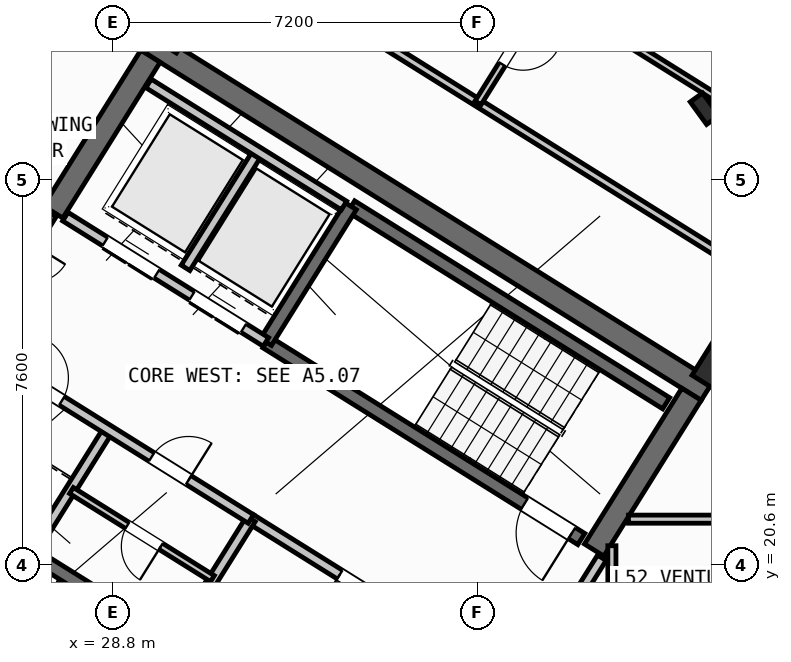
"""IFC4 building model, lengths in metres.
Left out: names, types, materials, properties, quantities, classifications, styles, units other than length and angle.
Written with IfcOpenShell. Run it as: python <this file> out.ifc"""

import sys

from ifc_helpers import new_model, si_unit, direction, frame, frame_2d, origin, origin_2d, place, context, subcontext, project, spatial, rectangle, hollow_rectangle, i_section, extrude, source, transform, mapped, element, fill, save


model = new_model("IFC4")
c1 = context("Model", 3, precision=1e-05, world=origin(), true_north=direction((0.0, 1.0)))
c2 = subcontext(c1, "Body", "Model", "MODEL_VIEW")
j1 = project(units=[si_unit("LENGTHUNIT", "METRE"), si_unit("PLANEANGLEUNIT", "RADIAN")], contexts=[c1])
p1 = place(None, origin())
s1 = spatial("IfcSite", under=j1, at=p1, CompositionType="ELEMENT")
p2 = place(p1, origin())
s2 = spatial("IfcBuilding", under=s1, at=p2, CompositionType="ELEMENT")
p3 = place(p2, frame((0.0, 0.0, 207.6)))
s3 = spatial("IfcBuildingStorey", under=s2, at=p3, CompositionType="ELEMENT", Elevation=207.6)
p4 = place(p3, frame((40.531, 24.036, 0.0), z_axis=(0.0, 0.0, 1.0), x_axis=(-0.848048787466, 0.529918157905, 0.0)))
e1 = element("IfcWall", 1, at=p4, inside=s3, PredefinedType="SHEAR", context=c2, shape_type="SweptSolid", body=[
    extrude(rectangle(XDim=13.04, YDim=0.45, at=frame_2d((6.52, 0.0))), origin(), (0.0, 0.0, 1.0), 3.35),
])
for number, where, z_axis, x_axis in (
    (2, (40.221, 23.965, 0.0), (0.0, 0.0, 1.0), (-0.53, -0.848, 0.0)),
    (3, (29.544, 30.636, 0.0), (0.0, 0.0, 1.0), (-0.53, -0.848, 0.0)),
):
    element("IfcWall", number, at=place(p3, frame(where, z_axis=z_axis, x_axis=x_axis)), inside=s3, PredefinedType="SHEAR", context=c2, shape_type="SweptSolid", body=[
        extrude(rectangle(XDim=3.625, YDim=0.45, at=frame_2d((1.812, 0.0))), origin(), (0.0, 0.0, 1.0), 3.35),
    ])
m1 = source(origin(), c2, "Body", "SweptSolid", [
    extrude(hollow_rectangle(XDim=0.8, YDim=0.8, WallThickness=0.032, at=origin_2d()), origin(), (0.0, 0.0, 1.0), 3.6),
])
for number, where, z_axis, x_axis in (
    (4, (40.783, 24.469, 0.0), (0.0, 0.0, 1.0), (-0.848, 0.53, 0.0)),
    (5, (29.928, 31.251, 0.0), (0.0, 0.0, 1.0), (-0.848, 0.53, 0.0)),
):
    element("IfcColumn", number, at=place(p3, frame(where, z_axis=z_axis, x_axis=x_axis)), inside=s3, PredefinedType="COLUMN", context=c2, shape_type="MappedRepresentation", body=[
        mapped(m1, transform((0.0, 0.0, 0.0), scale=1.0)),
    ])
m2 = source(origin(), c2, "Body", "SweptSolid", [
    extrude(i_section(OverallWidth=0.3, OverallDepth=0.55, WebThickness=0.015, FlangeThickness=0.029, at=origin_2d()), origin(), (0.0, 0.0, 1.0), 3.6),
])
p5 = place(p3, frame((40.479, 29.601, 0.0), z_axis=(0.0, 0.0, 1.0), x_axis=(0.809016994375, 0.587785252292, 0.0)))
e6 = element("IfcColumn", 6, at=p5, inside=s3, PredefinedType="COLUMN", context=c2, shape_type="MappedRepresentation", body=[
    mapped(m2, transform((0.0, 0.0, 0.0), scale=1.0)),
])
p6 = place(p3, frame((31.76, 12.183, 0.0), z_axis=(0.0, 0.0, 1.0), x_axis=(-0.848047074256, 0.529920899612, 0.0)))
e7 = element("IfcWall", 7, at=p6, inside=s3, PredefinedType="STANDARD", context=c2, shape_type="SweptSolid", body=[
    extrude(rectangle(XDim=30.652, YDim=0.32, at=frame_2d((15.326, 0.0))), origin(), (0.0, 0.0, 1.0), 3.35),
])
p7 = place(p6, frame((15.166, 0.0, 0.0)))
e8 = element("IfcOpeningElement", 8, at=p7, cuts=e7, PredefinedType="OPENING", context=c2, shape_type="SweptSolid", body=[
    extrude(rectangle(XDim=1.2, YDim=2.15, at=frame_2d((0.6, 1.075))), frame((0.0, 0.17, 0.0), z_axis=(0.0, -1.0, 0.0), x_axis=(1.0, 0.0, 0.0)), (0.0, 0.0, 1.0), 0.34),
])
p8 = place(p6, frame((2.24, 0.0, 0.9)))
e9 = element("IfcOpeningElement", 9, at=p8, cuts=e7, PredefinedType="OPENING", context=c2, shape_type="SweptSolid", body=[
    extrude(rectangle(XDim=1.65, YDim=1.45, at=frame_2d((0.825, 0.725))), frame((0.0, 0.17, 0.0), z_axis=(0.0, -1.0, 0.0), x_axis=(1.0, 0.0, 0.0)), (0.0, 0.0, 1.0), 0.34),
])
p9 = place(p6, frame((7.469, 0.0, 0.9)))
e10 = element("IfcOpeningElement", 10, at=p9, cuts=e7, PredefinedType="OPENING", context=c2, shape_type="SweptSolid", body=[
    extrude(rectangle(XDim=1.65, YDim=1.45, at=frame_2d((0.825, 0.725))), frame((0.0, 0.17, 0.0), z_axis=(0.0, -1.0, 0.0), x_axis=(1.0, 0.0, 0.0)), (0.0, 0.0, 1.0), 0.34),
])
p10 = place(p6, frame((12.623, 0.0, 1.0)))
e11 = element("IfcOpeningElement", 11, at=p10, cuts=e7, PredefinedType="OPENING", context=c2, shape_type="SweptSolid", body=[
    extrude(rectangle(XDim=0.9, YDim=1.25, at=frame_2d((0.45, 0.625))), frame((0.0, 0.17, 0.0), z_axis=(0.0, -1.0, 0.0), x_axis=(1.0, 0.0, 0.0)), (0.0, 0.0, 1.0), 0.34),
])
p11 = place(p6, frame((19.715, 0.0, 1.0)))
e12 = element("IfcOpeningElement", 12, at=p11, cuts=e7, PredefinedType="OPENING", context=c2, shape_type="SweptSolid", body=[
    extrude(rectangle(XDim=0.9, YDim=1.25, at=frame_2d((0.45, 0.625))), frame((0.0, 0.17, 0.0), z_axis=(0.0, -1.0, 0.0), x_axis=(1.0, 0.0, 0.0)), (0.0, 0.0, 1.0), 0.34),
])
p12 = place(p6, frame((25.566, 0.0, 0.9)))
e13 = element("IfcOpeningElement", 13, at=p12, cuts=e7, PredefinedType="OPENING", context=c2, shape_type="SweptSolid", body=[
    extrude(rectangle(XDim=1.65, YDim=1.45, at=frame_2d((0.825, 0.725))), frame((0.0, 0.17, 0.0), z_axis=(0.0, -1.0, 0.0), x_axis=(1.0, 0.0, 0.0)), (0.0, 0.0, 1.0), 0.34),
])
p13 = place(p6, frame((28.896, 0.0, 1.0)))
e14 = element("IfcOpeningElement", 14, at=p13, cuts=e7, PredefinedType="OPENING", context=c2, shape_type="SweptSolid", body=[
    extrude(rectangle(XDim=0.9, YDim=1.25, at=frame_2d((0.45, 0.625))), frame((0.0, 0.17, 0.0), z_axis=(0.0, -1.0, 0.0), x_axis=(1.0, 0.0, 0.0)), (0.0, 0.0, 1.0), 0.34),
])
p14 = place(p3, frame((31.28, 18.261, 0.0), z_axis=(0.0, 0.0, 1.0), x_axis=(-0.848051618787, 0.529913626805, 0.0)))
e15 = element("IfcWall", 15, at=p14, inside=s3, PredefinedType="SHEAR", context=c2, shape_type="SweptSolid", body=[
    extrude(rectangle(XDim=7.46, YDim=0.26, at=frame_2d((3.73, 0.0))), origin(), (0.0, 0.0, 1.0), 3.35),
])
p15 = place(p14, frame((0.36, 0.0, 0.0)))
e16 = element("IfcOpeningElement", 16, at=p15, cuts=e15, PredefinedType="OPENING", context=c2, shape_type="SweptSolid", body=[
    extrude(rectangle(XDim=0.86, YDim=2.05, at=frame_2d((0.43, 1.025))), frame((0.0, 0.14, 0.0), z_axis=(0.0, -1.0, 0.0), x_axis=(1.0, 0.0, 0.0)), (0.0, 0.0, 1.0), 0.28),
])
p16 = place(p3, frame((39.721, 23.788, 0.0), z_axis=(0.0, 0.0, 1.0), x_axis=(-0.848054434086, 0.529909121291, 0.0)))
e17 = element("IfcWall", 17, at=p16, inside=s3, PredefinedType="SHEAR", context=c2, shape_type="SweptSolid", body=[
    extrude(rectangle(XDim=7.33, YDim=0.26, at=frame_2d((3.665, 0.0))), origin(), (0.0, 0.0, 1.0), 3.35),
])
p17 = place(p3, frame((38.046, 21.108, 0.0), z_axis=(0.0, 0.0, 1.0), x_axis=(-0.848054434086, 0.529909121291, 0.0)))
e18 = element("IfcWall", 18, at=p17, inside=s3, PredefinedType="SHEAR", context=c2, shape_type="SweptSolid", body=[
    extrude(rectangle(XDim=7.33, YDim=0.26, at=frame_2d((3.665, 0.0))), origin(), (0.0, 0.0, 1.0), 3.35),
])
p18 = place(p17, frame((0.22, 0.0, 0.0)))
e19 = element("IfcOpeningElement", 19, at=p18, cuts=e18, PredefinedType="OPENING", context=c2, shape_type="SweptSolid", body=[
    extrude(rectangle(XDim=1.1, YDim=2.1, at=frame_2d((0.55, 1.05))), frame((0.0, 0.14, 0.0), z_axis=(0.0, -1.0, 0.0), x_axis=(1.0, 0.0, 0.0)), (0.0, 0.0, 1.0), 0.28),
])
p19 = place(p3, frame((33.496, 27.677, 0.0), z_axis=(0.0, 0.0, 1.0), x_axis=(-0.529908658664, -0.84805472316, 0.0)))
e20 = element("IfcWall", 20, at=p19, inside=s3, PredefinedType="SHEAR", context=c2, shape_type="SweptSolid", body=[
    extrude(rectangle(XDim=3.16, YDim=0.26, at=frame_2d((1.58, 0.0))), origin(), (0.0, 0.0, 1.0), 3.35),
])
p20 = place(p3, frame((36.459, 18.421, 0.0), z_axis=(0.0, 0.0, 1.0), x_axis=(-0.848059591691, 0.529900867089, 0.0)))
e21 = element("IfcWall", 21, at=p20, inside=s3, PredefinedType="STANDARD", context=c2, shape_type="SweptSolid", body=[
    extrude(rectangle(XDim=5.818, YDim=0.2, at=frame_2d((2.909, 0.0))), origin(), (0.0, 0.0, 1.0), 3.34),
])
p21 = place(p20, frame((2.598, 0.0, 0.0)))
e22 = element("IfcOpeningElement", 22, at=p21, cuts=e21, PredefinedType="OPENING", context=c2, shape_type="SweptSolid", body=[
    extrude(rectangle(XDim=1.15, YDim=2.1, at=frame_2d((0.575, 1.05))), frame((0.0, 0.11, 0.0), z_axis=(0.0, -1.0, 0.0), x_axis=(1.0, 0.0, 0.0)), (0.0, 0.0, 1.0), 0.22),
])
p22 = place(p3, frame((31.822, 24.998, 0.0), z_axis=(0.0, 0.0, 1.0), x_axis=(-0.848054125777, 0.529909614701, 0.0)))
e23 = element("IfcWall", 23, at=p22, inside=s3, PredefinedType="STANDARD", context=c2, shape_type="SweptSolid", body=[
    extrude(rectangle(XDim=4.668, YDim=0.2, at=frame_2d((2.334, 0.0))), origin(), (0.0, 0.0, 1.0), 3.34),
])
p23 = place(p22, frame((0.52, 0.0, 0.0)))
e24 = element("IfcOpeningElement", 24, at=p23, cuts=e23, PredefinedType="OPENING", context=c2, shape_type="SweptSolid", body=[
    extrude(rectangle(XDim=1.2, YDim=2.15, at=frame_2d((0.6, 1.075))), frame((0.0, 0.11, 0.0), z_axis=(0.0, -1.0, 0.0), x_axis=(1.0, 0.0, 0.0)), (0.0, 0.0, 1.0), 0.22),
])
p24 = place(p22, frame((2.54, 0.0, 0.0)))
e25 = element("IfcOpeningElement", 25, at=p24, cuts=e23, PredefinedType="OPENING", context=c2, shape_type="SweptSolid", body=[
    extrude(rectangle(XDim=1.2, YDim=2.15, at=frame_2d((0.6, 1.075))), frame((0.0, 0.11, 0.0), z_axis=(0.0, -1.0, 0.0), x_axis=(1.0, 0.0, 0.0)), (0.0, 0.0, 1.0), 0.22),
])
p25 = place(p3, frame((31.645, 28.716, 0.0), z_axis=(0.0, 0.0, 1.0), x_axis=(-0.52986693015, -0.848080795876, 0.0)))
e26 = element("IfcWall", 26, at=p25, inside=s3, PredefinedType="STANDARD", context=c2, shape_type="SweptSolid", body=[
    extrude(rectangle(XDim=2.66, YDim=0.2, at=frame_2d((1.33, 0.0))), origin(), (0.0, 0.0, 1.0), 3.34),
])
p26 = place(p3, frame((33.363, 27.69, 0.0), z_axis=(0.0, 0.0, 1.0), x_axis=(-0.84804957148, 0.529916903215, 0.0)))
e27 = element("IfcWall", 27, at=p26, inside=s3, PredefinedType="STANDARD", context=c2, shape_type="SweptSolid", body=[
    extrude(rectangle(XDim=4.548, YDim=0.2, at=frame_2d((2.274, 0.0))), origin(), (0.0, 0.0, 1.0), 3.34),
])
for number, where, z_axis, x_axis in (
    (28, (31.525, 21.504, 0.0), (0.0, 0.0, 1.0), (-0.53, -0.848, 0.0)),
    (29, (28.71, 23.263, 0.0), (0.0, 0.0, 1.0), (-0.53, -0.848, 0.0)),
):
    element("IfcWall", number, at=place(p3, frame(where, z_axis=z_axis, x_axis=x_axis)), inside=s3, PredefinedType="STANDARD", context=c2, shape_type="SweptSolid", body=[
        extrude(rectangle(XDim=2.88, YDim=0.2, at=frame_2d((1.44, 0.0))), origin(), (0.0, 0.0, 1.0), 3.34),
    ])
p27 = place(p3, frame((31.525, 21.504, 0.0), z_axis=(0.0, 0.0, 1.0), x_axis=(-0.848042066329, 0.529928913853, 0.0)))
e30 = element("IfcWall", 30, at=p27, inside=s3, PredefinedType="STANDARD", context=c2, shape_type="SweptSolid", body=[
    extrude(rectangle(XDim=6.268, YDim=0.2, at=frame_2d((3.134, 0.0))), origin(), (0.0, 0.0, 1.0), 3.34),
])
p28 = place(p27, frame((4.4, 0.0, 0.0)))
e31 = element("IfcOpeningElement", 31, at=p28, cuts=e30, PredefinedType="OPENING", context=c2, shape_type="SweptSolid", body=[
    extrude(rectangle(XDim=0.86, YDim=2.05, at=frame_2d((0.43, 1.025))), frame((0.0, 0.11, 0.0), z_axis=(0.0, -1.0, 0.0), x_axis=(1.0, 0.0, 0.0)), (0.0, 0.0, 1.0), 0.22),
])
p29 = place(p27, frame((1.45, 0.0, 0.0)))
e32 = element("IfcOpeningElement", 32, at=p29, cuts=e30, PredefinedType="OPENING", context=c2, shape_type="SweptSolid", body=[
    extrude(rectangle(XDim=0.86, YDim=2.05, at=frame_2d((0.43, 1.025))), frame((0.0, 0.11, 0.0), z_axis=(0.0, -1.0, 0.0), x_axis=(1.0, 0.0, 0.0)), (0.0, 0.0, 1.0), 0.22),
])
p30 = place(p3, frame((30.766, 20.327, 0.0), z_axis=(0.0, 0.0, 1.0), x_axis=(-0.848052663127, 0.529911955482, 0.0)))
e33 = element("IfcWall", 33, at=p30, inside=s3, PredefinedType="PLUMBINGWALL", context=c2, shape_type="SweptSolid", body=[
    extrude(rectangle(XDim=3.28, YDim=0.14, at=frame_2d((1.64, 0.0))), origin(), (0.0, 0.0, 1.0), 3.34),
])
p31 = place(p30, frame((1.2, 0.0, 0.0)))
e34 = element("IfcOpeningElement", 34, at=p31, cuts=e33, PredefinedType="OPENING", context=c2, shape_type="SweptSolid", body=[
    extrude(rectangle(XDim=0.78, YDim=2.05, at=frame_2d((0.39, 1.025))), frame((0.0, 0.08, 0.0), z_axis=(0.0, -1.0, 0.0), x_axis=(1.0, 0.0, 0.0)), (0.0, 0.0, 1.0), 0.16),
])
p32 = place(p3, frame((27.596, 27.52, 0.0), z_axis=(0.0, 0.0, 1.0), x_axis=(-0.529865479138, -0.848081702443, 0.0)))
e35 = element("IfcWall", 35, at=p32, inside=s3, PredefinedType="STANDARD", context=c2, shape_type="SweptSolid", body=[
    extrude(rectangle(XDim=2.96, YDim=0.2, at=frame_2d((1.48, 0.0))), origin(), (0.0, 0.0, 1.0), 3.34),
])
p33 = place(p32, frame((0.7, 0.0, 0.0)))
e36 = element("IfcOpeningElement", 36, at=p33, cuts=e35, PredefinedType="OPENING", context=c2, shape_type="SweptSolid", body=[
    extrude(rectangle(XDim=1.5, YDim=2.15, at=frame_2d((0.75, 1.075))), frame((0.0, 0.11, 0.0), z_axis=(0.0, -1.0, 0.0), x_axis=(1.0, 0.0, 0.0)), (0.0, 0.0, 1.0), 0.22),
])
p34 = place(p3, frame((31.239, 38.274, 0.0), z_axis=(0.0, 0.0, 1.0), x_axis=(-0.529925472745, -0.848044216616, 0.0)))
e37 = element("IfcWall", 37, at=p34, inside=s3, PredefinedType="PARTITIONING", context=c2, shape_type="SweptSolid", body=[
    extrude(rectangle(XDim=11.65, YDim=0.16, at=frame_2d((5.825, 0.0))), origin(), (0.0, 0.0, 1.0), 3.34),
])
p35 = place(p3, frame((41.936, 26.012, 0.0), z_axis=(0.0, 0.0, 1.0), x_axis=(-0.848051154596, 0.529914369676, 0.0)))
e38 = element("IfcWall", 38, at=p35, inside=s3, PredefinedType="PARTITIONING", context=c2, shape_type="SweptSolid", body=[
    extrude(rectangle(XDim=15.57, YDim=0.16, at=frame_2d((7.785, 0.0))), origin(), (0.0, 0.0, 1.0), 3.34),
])
p36 = place(p35, frame((10.83, 0.0, 0.0)))
e39 = element("IfcOpeningElement", 39, at=p36, cuts=e38, PredefinedType="OPENING", context=c2, shape_type="SweptSolid", body=[
    extrude(rectangle(XDim=1.0, YDim=2.1, at=frame_2d((0.5, 1.05))), frame((0.0, 0.09, 0.0), z_axis=(0.0, -1.0, 0.0), x_axis=(1.0, 0.0, 0.0)), (0.0, 0.0, 1.0), 0.18),
])
p37 = place(p3, frame((42.226, 28.873, 0.0), z_axis=(0.0, 0.0, 1.0), x_axis=(-0.848049134363, 0.529917602752, 0.0)))
e40 = element("IfcWall", 40, at=p37, inside=s3, PredefinedType="PLUMBINGWALL", context=c2, shape_type="SweptSolid", body=[
    extrude(rectangle(XDim=14.3, YDim=0.14, at=frame_2d((7.15, 0.0))), origin(), (0.0, 0.0, 1.0), 3.34),
])
p38 = place(p37, frame((9.57, 0.0, 0.0)))
e41 = element("IfcOpeningElement", 41, at=p38, cuts=e40, PredefinedType="OPENING", context=c2, shape_type="SweptSolid", body=[
    extrude(rectangle(XDim=0.92, YDim=2.08, at=frame_2d((0.46, 1.04))), frame((0.0, 0.08, 0.0), z_axis=(0.0, -1.0, 0.0), x_axis=(1.0, 0.0, 0.0)), (0.0, 0.0, 1.0), 0.16),
])
p39 = place(p3, frame((37.375, 31.904, 0.0), z_axis=(0.0, 0.0, 1.0), x_axis=(-0.529913878929, -0.848051461244, 0.0)))
e42 = element("IfcWall", 42, at=p39, inside=s3, PredefinedType="PLUMBINGWALL", context=c2, shape_type="SweptSolid", body=[
    extrude(rectangle(XDim=2.58, YDim=0.14, at=frame_2d((1.29, 0.0))), origin(), (0.0, 0.0, 1.0), 3.34),
])
p40 = place(p39, frame((0.9, 0.0, 0.0)))
e43 = element("IfcOpeningElement", 43, at=p40, cuts=e42, PredefinedType="OPENING", context=c2, shape_type="SweptSolid", body=[
    extrude(rectangle(XDim=0.78, YDim=2.05, at=frame_2d((0.39, 1.025))), frame((0.0, 0.08, 0.0), z_axis=(0.0, -1.0, 0.0), x_axis=(1.0, 0.0, 0.0)), (0.0, 0.0, 1.0), 0.16),
])
p41 = place(p3, frame((38.451, 20.737, 0.0), z_axis=(0.0, 0.0, 1.0), x_axis=(-0.529924799939, -0.848044637038, 0.0)))
e44 = element("IfcWall", 44, at=p41, inside=s3, PredefinedType="STANDARD", context=c2, shape_type="SweptSolid", body=[
    extrude(rectangle(XDim=2.96, YDim=0.2, at=frame_2d((1.48, 0.0))), origin(), (0.0, 0.0, 1.0), 3.34),
])
p42 = place(p41, frame((1.46, 0.0, 0.0)))
e45 = element("IfcOpeningElement", 45, at=p42, cuts=e44, PredefinedType="OPENING", context=c2, shape_type="SweptSolid", body=[
    extrude(rectangle(XDim=0.86, YDim=2.05, at=frame_2d((0.43, 1.025))), frame((0.0, 0.11, 0.0), z_axis=(0.0, -1.0, 0.0), x_axis=(1.0, 0.0, 0.0)), (0.0, 0.0, 1.0), 0.22),
])
p43 = place(p3, frame((38.65, 17.93, 0.0), z_axis=(0.0, 0.0, 1.0), x_axis=(0.0, 1.0, 0.0)))
e46 = element("IfcWall", 46, at=p43, inside=s3, PredefinedType="PARTITIONING", context=c2, shape_type="SweptSolid", body=[
    extrude(rectangle(XDim=3.046, YDim=0.16, at=frame_2d((1.523, 0.0))), origin(), (0.0, 0.0, 1.0), 3.34),
])
p44 = place(p3, frame((38.978, 21.5, 0.0), z_axis=(0.0, 0.0, 1.0), x_axis=(1.0, 0.0, 0.0)))
e47 = element("IfcWall", 47, at=p44, inside=s3, PredefinedType="PARTITIONING", context=c2, shape_type="SweptSolid", body=[
    extrude(rectangle(XDim=7.336, YDim=0.16, at=frame_2d((3.668, 0.0))), origin(), (0.0, 0.0, 1.0), 3.34),
])
m3 = source(origin(), c2, "Body", "SweptSolid", [
    extrude(rectangle(XDim=1.1, YDim=2.1, at=frame_2d((0.55, 1.05))), frame((0.0, 0.025, 0.0), z_axis=(0.0, -1.0, 0.0), x_axis=(1.0, 0.0, 0.0)), (0.0, 0.0, 1.0), 0.05),
])
p45 = place(p18, origin())
e48 = element("IfcDoor", 48, at=p45, inside=s3, OperationType="SINGLE_SWING_LEFT", PredefinedType="DOOR", context=c2, shape_type="MappedRepresentation", body=[
    mapped(m3, transform((0.0, 0.0, 0.0), scale=1.0)),
])
fill(e19, e48)
m4 = source(origin(), c2, "Body", "SweptSolid", [
    extrude(rectangle(XDim=1.15, YDim=2.1, at=frame_2d((0.575, 1.05))), frame((0.0, 0.025, 0.0), z_axis=(0.0, -1.0, 0.0), x_axis=(1.0, 0.0, 0.0)), (0.0, 0.0, 1.0), 0.05),
])
p46 = place(p21, origin())
e49 = element("IfcDoor", 49, at=p46, inside=s3, OperationType="SINGLE_SWING_RIGHT", PredefinedType="DOOR", context=c2, shape_type="MappedRepresentation", body=[
    mapped(m4, transform((0.0, 0.0, 0.0), scale=1.0)),
])
fill(e22, e49)
m5 = source(origin(), c2, "Body", "SweptSolid", [
    extrude(rectangle(XDim=1.2, YDim=2.15, at=frame_2d((0.6, 1.075))), frame((0.0, 0.025, 0.0), z_axis=(0.0, -1.0, 0.0), x_axis=(1.0, 0.0, 0.0)), (0.0, 0.0, 1.0), 0.05),
])
p47 = place(p23, origin())
e50 = element("IfcDoor", 50, at=p47, inside=s3, OperationType="DOUBLE_DOOR_SLIDING", PredefinedType="DOOR", context=c2, shape_type="MappedRepresentation", body=[
    mapped(m5, transform((0.0, 0.0, 0.0), scale=1.0)),
])
fill(e24, e50)
p48 = place(p24, origin())
e51 = element("IfcDoor", 51, at=p48, inside=s3, OperationType="DOUBLE_DOOR_SLIDING", PredefinedType="DOOR", context=c2, shape_type="MappedRepresentation", body=[
    mapped(m5, transform((0.0, 0.0, 0.0), scale=1.0)),
])
fill(e25, e51)
m6 = source(origin(), c2, "Body", "SweptSolid", [
    extrude(rectangle(XDim=0.86, YDim=2.05, at=frame_2d((0.43, 1.025))), frame((0.0, 0.025, 0.0), z_axis=(0.0, -1.0, 0.0), x_axis=(1.0, 0.0, 0.0)), (0.0, 0.0, 1.0), 0.05),
])
p49 = place(p28, frame((0.86, 0.0, 0.0), z_axis=(0.0, 0.0, 1.0), x_axis=(-1.0, 0.0, 0.0)))
e52 = element("IfcDoor", 52, at=p49, inside=s3, OperationType="SINGLE_SWING_LEFT", PredefinedType="DOOR", context=c2, shape_type="MappedRepresentation", body=[
    mapped(m6, transform((0.0, 0.0, 0.0), scale=1.0)),
])
fill(e31, e52)
p50 = place(p29, frame((0.86, 0.0, 0.0), z_axis=(0.0, 0.0, 1.0), x_axis=(-1.0, 0.0, 0.0)))
e53 = element("IfcDoor", 53, at=p50, inside=s3, OperationType="SINGLE_SWING_RIGHT", PredefinedType="DOOR", context=c2, shape_type="MappedRepresentation", body=[
    mapped(m6, transform((0.0, 0.0, 0.0), scale=1.0)),
])
fill(e32, e53)
m7 = source(origin(), c2, "Body", "SweptSolid", [
    extrude(rectangle(XDim=0.78, YDim=2.05, at=frame_2d((0.39, 1.025))), frame((0.0, 0.025, 0.0), z_axis=(0.0, -1.0, 0.0), x_axis=(1.0, 0.0, 0.0)), (0.0, 0.0, 1.0), 0.05),
])
p51 = place(p31, origin())
e54 = element("IfcDoor", 54, at=p51, inside=s3, OperationType="SINGLE_SWING_LEFT", PredefinedType="DOOR", context=c2, shape_type="MappedRepresentation", body=[
    mapped(m7, transform((0.0, 0.0, 0.0), scale=1.0)),
])
fill(e34, e54)
p52 = place(p40, origin())
e55 = element("IfcDoor", 55, at=p52, inside=s3, OperationType="SINGLE_SWING_LEFT", PredefinedType="DOOR", context=c2, shape_type="MappedRepresentation", body=[
    mapped(m7, transform((0.0, 0.0, 0.0), scale=1.0)),
])
fill(e43, e55)
save(model, sys.argv[1])
